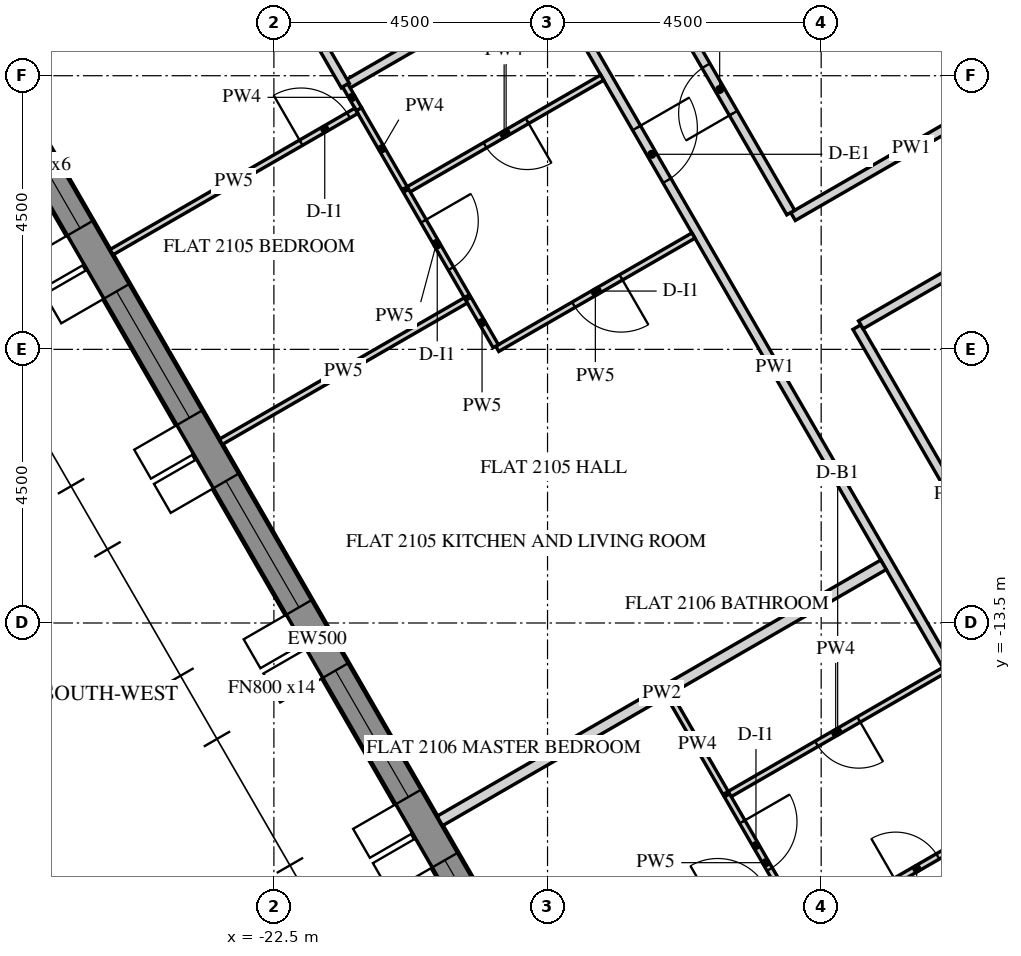
"""IFC4 building model, lengths in metres.
Left out: names, types, materials, properties, quantities, classifications, styles, units other than length and angle.
Written with IfcOpenShell. Run it as: python <this file> out.ifc"""

import sys

from ifc_helpers import new_model, si_unit, direction, frame, frame_2d, origin, place, context, subcontext, project, spatial, polyline, rectangle, outline, extrude, element, fill, save


model = new_model("IFC4")
c1 = context("Model", 3, precision=1e-05, world=origin(), true_north=direction((0.0, 1.0)))
c2 = subcontext(c1, "Body", "Model", "MODEL_VIEW")
j1 = project(units=[si_unit("LENGTHUNIT", "METRE"), si_unit("PLANEANGLEUNIT", "RADIAN")], contexts=[c1])
p1 = place(None, origin())
s1 = spatial("IfcSite", under=j1, at=p1, CompositionType="ELEMENT")
p2 = place(p1, origin())
s2 = spatial("IfcBuilding", under=s1, at=p2, CompositionType="ELEMENT")
p3 = place(p2, frame((0.0, 0.0, 267.9)))
s3 = spatial("IfcBuildingStorey", under=s2, at=p3, CompositionType="ELEMENT", Elevation=267.9)
p4 = place(p3, frame((-28.149, -2.745, -0.15), z_axis=(0.0, 0.0, 1.0), x_axis=(0.500003737743, -0.866023245787, 0.0)))
e1 = element("IfcWall", 1, at=p4, inside=s3, PredefinedType="SOLIDWALL", context=c2, shape_type="SweptSolid", body=[
    extrude(outline(polyline([(-0.021, -0.25), (25.468, -0.25), (25.421, 0.25), (0.021, 0.25), (-0.021, -0.25)])), origin(), (0.0, 0.0, 1.0), 3.9),
])
p5 = place(p4, frame((2.522, 0.0, 0.75)))
e2 = element("IfcOpeningElement", 2, at=p5, cuts=e1, PredefinedType="OPENING", context=c2, shape_type="SweptSolid", body=[
    extrude(rectangle(XDim=2.4, YDim=2.7, at=frame_2d((1.2, 1.35))), frame((0.0, 0.26, 0.0), z_axis=(0.0, -1.0, 0.0), x_axis=(1.0, 0.0, 0.0)), (0.0, 0.0, 1.0), 0.52),
])
p6 = place(p4, frame((6.122, 0.0, 0.75)))
e3 = element("IfcOpeningElement", 3, at=p6, cuts=e1, PredefinedType="OPENING", context=c2, shape_type="SweptSolid", body=[
    extrude(rectangle(XDim=2.4, YDim=2.7, at=frame_2d((1.2, 1.35))), frame((0.0, 0.26, 0.0), z_axis=(0.0, -1.0, 0.0), x_axis=(1.0, 0.0, 0.0)), (0.0, 0.0, 1.0), 0.52),
])
p7 = place(p4, frame((9.722, 0.0, 0.75)))
e4 = element("IfcOpeningElement", 4, at=p7, cuts=e1, PredefinedType="OPENING", context=c2, shape_type="SweptSolid", body=[
    extrude(rectangle(XDim=2.4, YDim=2.7, at=frame_2d((1.2, 1.35))), frame((0.0, 0.26, 0.0), z_axis=(0.0, -1.0, 0.0), x_axis=(1.0, 0.0, 0.0)), (0.0, 0.0, 1.0), 0.52),
])
p8 = place(p4, frame((13.323, 0.0, 0.75)))
e5 = element("IfcOpeningElement", 5, at=p8, cuts=e1, PredefinedType="OPENING", context=c2, shape_type="SweptSolid", body=[
    extrude(rectangle(XDim=2.4, YDim=2.7, at=frame_2d((1.2, 1.35))), frame((0.0, 0.26, 0.0), z_axis=(0.0, -1.0, 0.0), x_axis=(1.0, 0.0, 0.0)), (0.0, 0.0, 1.0), 0.52),
])
p9 = place(p4, frame((16.922, 0.0, 0.75)))
e6 = element("IfcOpeningElement", 6, at=p9, cuts=e1, PredefinedType="OPENING", context=c2, shape_type="SweptSolid", body=[
    extrude(rectangle(XDim=2.4, YDim=2.7, at=frame_2d((1.2, 1.35))), frame((0.0, 0.26, 0.0), z_axis=(0.0, -1.0, 0.0), x_axis=(1.0, 0.0, 0.0)), (0.0, 0.0, 1.0), 0.52),
])
p10 = place(p4, frame((20.522, 0.0, 0.75)))
e7 = element("IfcOpeningElement", 7, at=p10, cuts=e1, PredefinedType="OPENING", context=c2, shape_type="SweptSolid", body=[
    extrude(rectangle(XDim=2.4, YDim=2.7, at=frame_2d((1.2, 1.35))), frame((0.0, 0.26, 0.0), z_axis=(0.0, -1.0, 0.0), x_axis=(1.0, 0.0, 0.0)), (0.0, 0.0, 1.0), 0.52),
])
p11 = place(p3, frame((-12.471, 0.0, -0.15), z_axis=(0.0, 0.0, 1.0), x_axis=(0.499996419489, -0.866027470984, 0.0)))
e8 = element("IfcWall", 8, at=p11, inside=s3, PredefinedType="SHEAR", context=c2, shape_type="SweptSolid", body=[
    extrude(outline(polyline([(-0.115, -0.2), (12.586, -0.2), (12.355, 0.2), (0.115, 0.2), (-0.115, -0.2)])), origin(), (0.0, 0.0, 1.0), 3.9),
])
p12 = place(p11, frame((5.306, 0.0, 0.15)))
e9 = element("IfcOpeningElement", 9, at=p12, cuts=e8, PredefinedType="OPENING", context=c2, shape_type="SweptSolid", body=[
    extrude(rectangle(XDim=1.8, YDim=2.4, at=frame_2d((0.9, 1.2))), frame((0.0, 0.21, 0.0), z_axis=(0.0, -1.0, 0.0), x_axis=(1.0, 0.0, 0.0)), (0.0, 0.0, 1.0), 0.42),
])
p13 = place(p3, frame((-17.998, -2.826, 0.0), z_axis=(0.0, 0.0, 1.0), x_axis=(0.500003306199, -0.866023494941, 0.0)))
e10 = element("IfcWall", 10, at=p13, inside=s3, PredefinedType="PARTITIONING", context=c2, shape_type="SweptSolid", body=[
    extrude(rectangle(XDim=14.949, YDim=0.15, at=frame_2d((7.475, 0.0))), origin(), (0.0, 0.0, 1.0), 2.988),
])
p14 = place(p13, frame((2.925, 0.0, 0.0)))
e11 = element("IfcOpeningElement", 11, at=p14, cuts=e10, PredefinedType="OPENING", context=c2, shape_type="SweptSolid", body=[
    extrude(rectangle(XDim=1.0, YDim=2.1, at=frame_2d((0.5, 1.05))), frame((0.0, 0.085, 0.0), z_axis=(0.0, -1.0, 0.0), x_axis=(1.0, 0.0, 0.0)), (0.0, 0.0, 1.0), 0.17),
])
p15 = place(p13, frame((13.799, 0.0, 0.0)))
e12 = element("IfcOpeningElement", 12, at=p15, cuts=e10, PredefinedType="OPENING", context=c2, shape_type="SweptSolid", body=[
    extrude(rectangle(XDim=1.0, YDim=2.1, at=frame_2d((0.5, 1.05))), frame((0.0, 0.085, 0.0), z_axis=(0.0, -1.0, 0.0), x_axis=(1.0, 0.0, 0.0)), (0.0, 0.0, 1.0), 0.17),
])
p16 = place(p3, frame((-21.327, -4.661, 0.0), z_axis=(0.0, 0.0, 1.0), x_axis=(0.866044365799, 0.499967155389, 0.0)))
e13 = element("IfcWall", 13, at=p16, inside=s3, PredefinedType="PARTITIONING", context=c2, shape_type="SweptSolid", body=[
    extrude(rectangle(XDim=3.8, YDim=0.15, at=frame_2d((1.9, 0.0))), origin(), (0.0, 0.0, 1.0), 2.988),
])
p17 = place(p3, frame((-26.971, -4.284, 0.0), z_axis=(0.0, 0.0, 1.0), x_axis=(0.866018584967, 0.500011810352, 0.0)))
e14 = element("IfcWall", 14, at=p17, inside=s3, PredefinedType="PARTITIONING", context=c2, shape_type="SweptSolid", body=[
    extrude(rectangle(XDim=4.699, YDim=0.15, at=frame_2d((2.349, 0.0))), origin(), (0.0, 0.0, 1.0), 2.988),
])
p18 = place(p3, frame((-22.9, -1.936, 0.0), z_axis=(0.0, 0.0, 1.0), x_axis=(0.50003099832, -0.866007506156, 0.0)))
e15 = element("IfcWall", 15, at=p18, inside=s3, PredefinedType="PARTITIONING", context=c2, shape_type="SweptSolid", body=[
    extrude(rectangle(XDim=3.151, YDim=0.15, at=frame_2d((1.575, 0.0))), origin(), (0.0, 0.0, 1.0), 2.988),
])
p19 = place(p3, frame((-10.066, -4.566, 0.0), z_axis=(0.0, 0.0, 1.0), x_axis=(-0.866031096941, -0.499990139034, 0.0)))
e16 = element("IfcWall", 16, at=p19, inside=s3, PredefinedType="PARTITIONING", context=c2, shape_type="SweptSolid", body=[
    extrude(rectangle(XDim=4.5, YDim=0.15, at=frame_2d((2.25, 0.0))), origin(), (0.0, 0.0, 1.0), 2.988),
])
p20 = place(p3, frame((-14.0, -6.751, 0.0), z_axis=(0.0, 0.0, 1.0), x_axis=(-0.500008739126, 0.866020358189, 0.0)))
e17 = element("IfcWall", 17, at=p20, inside=s3, PredefinedType="PARTITIONING", context=c2, shape_type="SweptSolid", body=[
    extrude(rectangle(XDim=4.675, YDim=0.15, at=frame_2d((2.338, 0.0))), origin(), (0.0, 0.0, 1.0), 2.988),
])
p21 = place(p20, frame((1.888, 0.0, 0.0)))
e18 = element("IfcOpeningElement", 18, at=p21, cuts=e17, PredefinedType="OPENING", context=c2, shape_type="SweptSolid", body=[
    extrude(rectangle(XDim=0.9, YDim=2.1, at=frame_2d((0.45, 1.05))), frame((0.0, 0.085, 0.0), z_axis=(0.0, -1.0, 0.0), x_axis=(1.0, 0.0, 0.0)), (0.0, 0.0, 1.0), 0.17),
])
p22 = place(p3, frame((-9.735, -14.138, 0.0), z_axis=(0.0, 0.0, 1.0), x_axis=(-0.500018385592, 0.866014788598, 0.0)))
e19 = element("IfcWall", 19, at=p22, inside=s3, PredefinedType="PARTITIONING", context=c2, shape_type="SweptSolid", body=[
    extrude(rectangle(XDim=6.356, YDim=0.15, at=frame_2d((3.178, 0.0))), origin(), (0.0, 0.0, 1.0), 2.988),
])
p23 = place(p3, frame((-12.848, -8.597, 0.0), z_axis=(0.0, 0.0, 1.0), x_axis=(0.866017452598, 0.500013771606, 0.0)))
e20 = element("IfcWall", 20, at=p23, inside=s3, PredefinedType="PARTITIONING", context=c2, shape_type="SweptSolid", body=[
    extrude(rectangle(XDim=4.425, YDim=0.15, at=frame_2d((2.213, 0.0))), origin(), (0.0, 0.0, 1.0), 2.988),
])
p24 = place(p3, frame((-15.601, -7.129, 0.0), z_axis=(0.0, 0.0, 1.0), x_axis=(-0.866056803351, -0.499945610411, 0.0)))
e21 = element("IfcWall", 21, at=p24, inside=s3, PredefinedType="PARTITIONING", context=c2, shape_type="SweptSolid", body=[
    extrude(rectangle(XDim=3.725, YDim=0.1, at=frame_2d((1.863, 0.0))), origin(), (0.0, 0.0, 1.0), 2.988),
])
p25 = place(p24, frame((1.375, 0.0, 0.0)))
e22 = element("IfcOpeningElement", 22, at=p25, cuts=e21, PredefinedType="OPENING", context=c2, shape_type="SweptSolid", body=[
    extrude(rectangle(XDim=0.9, YDim=2.1, at=frame_2d((0.45, 1.05))), frame((0.0, 0.06, 0.0), z_axis=(0.0, -1.0, 0.0), x_axis=(1.0, 0.0, 0.0)), (0.0, 0.0, 1.0), 0.12),
])
p26 = place(p3, frame((-18.852, -8.948, 0.0), z_axis=(0.0, 0.0, 1.0), x_axis=(-0.500074377092, 0.865982457891, 0.0)))
e23 = element("IfcWall", 23, at=p26, inside=s3, PredefinedType="PARTITIONING", context=c2, shape_type="SweptSolid", body=[
    extrude(rectangle(XDim=0.901, YDim=0.1, at=frame_2d((0.45, 0.0))), origin(), (0.0, 0.0, 1.0), 2.988),
])
p27 = place(p3, frame((-19.344, -8.195, 0.0), z_axis=(0.0, 0.0, 1.0), x_axis=(-0.866034331223, -0.499984536904, 0.0)))
e24 = element("IfcWall", 24, at=p27, inside=s3, PredefinedType="PARTITIONING", context=c2, shape_type="SweptSolid", body=[
    extrude(rectangle(XDim=4.65, YDim=0.1, at=frame_2d((2.325, 0.0))), origin(), (0.0, 0.0, 1.0), 2.988),
])
p28 = place(p3, frame((-19.771, -16.755, 0.0), z_axis=(0.0, 0.0, 1.0), x_axis=(0.866026819143, 0.499997548519, 0.0)))
e25 = element("IfcWall", 25, at=p28, inside=s3, PredefinedType="PARTITIONING", context=c2, shape_type="SweptSolid", body=[
    extrude(rectangle(XDim=8.425, YDim=0.18, at=frame_2d((4.212, 0.0))), origin(), (0.0, 0.0, 1.0), 2.988),
])
p29 = place(p3, frame((-17.101, -4.531, 0.0), z_axis=(0.0, 0.0, 1.0), x_axis=(-0.866028424924, -0.499994767197, 0.0)))
e26 = element("IfcWall", 26, at=p29, inside=s3, PredefinedType="PARTITIONING", context=c2, shape_type="SweptSolid", body=[
    extrude(rectangle(XDim=3.725, YDim=0.1, at=frame_2d((1.863, 0.0))), origin(), (0.0, 0.0, 1.0), 2.988),
])
p30 = place(p29, frame((1.425, 0.0, 0.0)))
e27 = element("IfcOpeningElement", 27, at=p30, cuts=e26, PredefinedType="OPENING", context=c2, shape_type="SweptSolid", body=[
    extrude(rectangle(XDim=0.8, YDim=2.1, at=frame_2d((0.4, 1.05))), frame((0.0, 0.06, 0.0), z_axis=(0.0, -1.0, 0.0), x_axis=(1.0, 0.0, 0.0)), (0.0, 0.0, 1.0), 0.12),
])
p31 = place(p3, frame((-20.328, -6.392, 0.0), z_axis=(0.0, 0.0, 1.0), x_axis=(0.500031897912, -0.866006986733, 0.0)))
e28 = element("IfcWall", 28, at=p31, inside=s3, PredefinedType="PARTITIONING", context=c2, shape_type="SweptSolid", body=[
    extrude(rectangle(XDim=2.003, YDim=0.1, at=frame_2d((1.001, 0.0))), origin(), (0.0, 0.0, 1.0), 2.988),
])
p32 = place(p31, frame((0.578, 0.0, 0.0)))
e29 = element("IfcOpeningElement", 29, at=p32, cuts=e28, PredefinedType="OPENING", context=c2, shape_type="SweptSolid", body=[
    extrude(rectangle(XDim=0.9, YDim=2.1, at=frame_2d((0.45, 1.05))), frame((0.0, 0.06, 0.0), z_axis=(0.0, -1.0, 0.0), x_axis=(1.0, 0.0, 0.0)), (0.0, 0.0, 1.0), 0.12),
])
p33 = place(p3, frame((-21.328, -4.659, 0.0), z_axis=(0.0, 0.0, 1.0), x_axis=(0.500250683452, -0.865880623242, 0.0)))
e30 = element("IfcWall", 30, at=p33, inside=s3, PredefinedType="PARTITIONING", context=c2, shape_type="SweptSolid", body=[
    extrude(rectangle(XDim=0.453, YDim=0.1, at=frame_2d((0.227, 0.0))), origin(), (0.0, 0.0, 1.0), 2.988),
])
p34 = place(p3, frame((-21.101, -5.052, 0.0), z_axis=(0.0, 0.0, 1.0), x_axis=(0.49997126526, -0.866041993159, 0.0)))
e31 = element("IfcWall", 31, at=p34, inside=s3, PredefinedType="PARTITIONING", context=c2, shape_type="SweptSolid", body=[
    extrude(rectangle(XDim=1.5, YDim=0.1, at=frame_2d((0.75, 0.0))), origin(), (0.0, 0.0, 1.0), 2.988),
])
p35 = place(p3, frame((-25.171, -7.402, 0.0), z_axis=(0.0, 0.0, 1.0), x_axis=(0.86602120543, 0.500007271693, 0.0)))
e32 = element("IfcWall", 32, at=p35, inside=s3, PredefinedType="PARTITIONING", context=c2, shape_type="SweptSolid", body=[
    extrude(rectangle(XDim=4.65, YDim=0.1, at=frame_2d((2.325, 0.0))), origin(), (0.0, 0.0, 1.0), 2.988),
])
p36 = place(p35, frame((3.6, 0.0, 0.0)))
e33 = element("IfcOpeningElement", 33, at=p36, cuts=e32, PredefinedType="OPENING", context=c2, shape_type="SweptSolid", body=[
    extrude(rectangle(XDim=0.9, YDim=2.1, at=frame_2d((0.45, 1.05))), frame((0.0, 0.06, 0.0), z_axis=(0.0, -1.0, 0.0), x_axis=(1.0, 0.0, 0.0)), (0.0, 0.0, 1.0), 0.12),
])
p37 = place(p3, frame((-4.238, -15.408, 0.0), z_axis=(0.0, 0.0, 1.0), x_axis=(-0.86602504101, -0.500000628343, 0.0)))
e34 = element("IfcWall", 34, at=p37, inside=s3, PredefinedType="PARTITIONING", context=c2, shape_type="SweptSolid", body=[
    extrude(rectangle(XDim=9.826, YDim=0.1, at=frame_2d((4.913, 0.0))), origin(), (0.0, 0.0, 1.0), 2.988),
])
p38 = place(p3, frame((-11.475, -14.275, 0.0), z_axis=(0.0, 0.0, 1.0), x_axis=(-0.866019999656, -0.500009360108, 0.0)))
e35 = element("IfcWall", 35, at=p38, inside=s3, PredefinedType="PARTITIONING", context=c2, shape_type="SweptSolid", body=[
    extrude(rectangle(XDim=4.125, YDim=0.1, at=frame_2d((2.062, 0.0))), origin(), (0.0, 0.0, 1.0), 2.988),
])
p39 = place(p38, frame((1.625, 0.0, 0.0)))
e36 = element("IfcOpeningElement", 36, at=p39, cuts=e35, PredefinedType="OPENING", context=c2, shape_type="SweptSolid", body=[
    extrude(rectangle(XDim=0.8, YDim=2.1, at=frame_2d((0.4, 1.05))), frame((0.0, 0.06, 0.0), z_axis=(0.0, -1.0, 0.0), x_axis=(1.0, 0.0, 0.0)), (0.0, 0.0, 1.0), 0.12),
])
p40 = place(p3, frame((-15.048, -16.335, 0.0), z_axis=(0.0, 0.0, 1.0), x_axis=(0.500014808323, -0.866016854026, 0.0)))
e37 = element("IfcWall", 37, at=p40, inside=s3, PredefinedType="PARTITIONING", context=c2, shape_type="SweptSolid", body=[
    extrude(rectangle(XDim=2.554, YDim=0.1, at=frame_2d((1.277, 0.0))), origin(), (0.0, 0.0, 1.0), 2.988),
])
p41 = place(p40, frame((0.502, 0.0, 0.0)))
e38 = element("IfcOpeningElement", 38, at=p41, cuts=e37, PredefinedType="OPENING", context=c2, shape_type="SweptSolid", body=[
    extrude(rectangle(XDim=0.9, YDim=2.1, at=frame_2d((0.45, 1.05))), frame((0.0, 0.06, 0.0), z_axis=(0.0, -1.0, 0.0), x_axis=(1.0, 0.0, 0.0)), (0.0, 0.0, 1.0), 0.12),
])
p42 = place(p3, frame((-13.747, -18.589, 0.0), z_axis=(0.0, 0.0, 1.0), x_axis=(0.866022251081, 0.500005460603, 0.0)))
e39 = element("IfcWall", 39, at=p42, inside=s3, PredefinedType="PARTITIONING", context=c2, shape_type="SweptSolid", body=[
    extrude(rectangle(XDim=5.725, YDim=0.1, at=frame_2d((2.863, 0.0))), origin(), (0.0, 0.0, 1.0), 2.988),
])
p43 = place(p42, frame((1.7, 0.0, 0.0)))
e40 = element("IfcOpeningElement", 40, at=p43, cuts=e39, PredefinedType="OPENING", context=c2, shape_type="SweptSolid", body=[
    extrude(rectangle(XDim=0.8, YDim=2.1, at=frame_2d((0.4, 1.05))), frame((0.0, 0.06, 0.0), z_axis=(0.0, -1.0, 0.0), x_axis=(1.0, 0.0, 0.0)), (0.0, 0.0, 1.0), 0.12),
])
p44 = place(p3, frame((-16.002, -14.683, 0.0), z_axis=(0.0, 0.0, 1.0), x_axis=(0.500059143742, -0.865991254436, 0.0)))
e41 = element("IfcWall", 41, at=p44, inside=s3, PredefinedType="PARTITIONING", context=c2, shape_type="SweptSolid", body=[
    extrude(rectangle(XDim=1.862, YDim=0.1, at=frame_2d((0.931, 0.0))), origin(), (0.0, 0.0, 1.0), 2.988),
])
p45 = place(p5, frame((0.0, 0.18, 0.0)))
e42 = element("IfcWindow", 42, at=p45, inside=s3, PartitioningType="DOUBLE_PANEL_VERTICAL", PredefinedType="WINDOW", context=c2, shape_type="SweptSolid", body=[
    extrude(rectangle(XDim=2.4, YDim=2.7, at=frame_2d((1.2, 1.35))), frame((0.0, 0.03, 0.0), z_axis=(0.0, -1.0, 0.0), x_axis=(1.0, 0.0, 0.0)), (0.0, 0.0, 1.0), 0.06),
])
fill(e2, e42)
p46 = place(p6, frame((0.0, 0.18, 0.0)))
e43 = element("IfcWindow", 43, at=p46, inside=s3, PartitioningType="DOUBLE_PANEL_VERTICAL", PredefinedType="WINDOW", context=c2, shape_type="SweptSolid", body=[
    extrude(rectangle(XDim=2.4, YDim=2.7, at=frame_2d((1.2, 1.35))), frame((0.0, 0.03, 0.0), z_axis=(0.0, -1.0, 0.0), x_axis=(1.0, 0.0, 0.0)), (0.0, 0.0, 1.0), 0.06),
])
fill(e3, e43)
p47 = place(p7, frame((0.0, 0.18, 0.0)))
e44 = element("IfcWindow", 44, at=p47, inside=s3, PartitioningType="DOUBLE_PANEL_VERTICAL", PredefinedType="WINDOW", context=c2, shape_type="SweptSolid", body=[
    extrude(rectangle(XDim=2.4, YDim=2.7, at=frame_2d((1.2, 1.35))), frame((0.0, 0.03, 0.0), z_axis=(0.0, -1.0, 0.0), x_axis=(1.0, 0.0, 0.0)), (0.0, 0.0, 1.0), 0.06),
])
fill(e4, e44)
p48 = place(p8, frame((0.0, 0.18, 0.0)))
e45 = element("IfcWindow", 45, at=p48, inside=s3, PartitioningType="DOUBLE_PANEL_VERTICAL", PredefinedType="WINDOW", context=c2, shape_type="SweptSolid", body=[
    extrude(rectangle(XDim=2.4, YDim=2.7, at=frame_2d((1.2, 1.35))), frame((0.0, 0.03, 0.0), z_axis=(0.0, -1.0, 0.0), x_axis=(1.0, 0.0, 0.0)), (0.0, 0.0, 1.0), 0.06),
])
fill(e5, e45)
p49 = place(p9, frame((0.0, 0.18, 0.0)))
e46 = element("IfcWindow", 46, at=p49, inside=s3, PartitioningType="DOUBLE_PANEL_VERTICAL", PredefinedType="WINDOW", context=c2, shape_type="SweptSolid", body=[
    extrude(rectangle(XDim=2.4, YDim=2.7, at=frame_2d((1.2, 1.35))), frame((0.0, 0.03, 0.0), z_axis=(0.0, -1.0, 0.0), x_axis=(1.0, 0.0, 0.0)), (0.0, 0.0, 1.0), 0.06),
])
fill(e6, e46)
p50 = place(p14, origin())
e47 = element("IfcDoor", 47, at=p50, inside=s3, OperationType="SINGLE_SWING_RIGHT", PredefinedType="DOOR", context=c2, shape_type="SweptSolid", body=[
    extrude(rectangle(XDim=1.0, YDim=2.1, at=frame_2d((0.5, 1.05))), frame((0.0, 0.025, 0.0), z_axis=(0.0, -1.0, 0.0), x_axis=(1.0, 0.0, 0.0)), (0.0, 0.0, 1.0), 0.05),
])
fill(e11, e47)
p51 = place(p30, origin())
e48 = element("IfcDoor", 48, at=p51, inside=s3, OperationType="SINGLE_SWING_RIGHT", PredefinedType="DOOR", context=c2, shape_type="SweptSolid", body=[
    extrude(rectangle(XDim=0.8, YDim=2.1, at=frame_2d((0.4, 1.05))), frame((0.0, 0.025, 0.0), z_axis=(0.0, -1.0, 0.0), x_axis=(1.0, 0.0, 0.0)), (0.0, 0.0, 1.0), 0.05),
])
fill(e27, e48)
p52 = place(p25, origin())
e49 = element("IfcDoor", 49, at=p52, inside=s3, OperationType="SINGLE_SWING_RIGHT", PredefinedType="DOOR", context=c2, shape_type="SweptSolid", body=[
    extrude(rectangle(XDim=0.9, YDim=2.1, at=frame_2d((0.45, 1.05))), frame((0.0, 0.025, 0.0), z_axis=(0.0, -1.0, 0.0), x_axis=(1.0, 0.0, 0.0)), (0.0, 0.0, 1.0), 0.05),
])
fill(e22, e49)
p53 = place(p36, origin())
e50 = element("IfcDoor", 50, at=p53, inside=s3, OperationType="SINGLE_SWING_RIGHT", PredefinedType="DOOR", context=c2, shape_type="SweptSolid", body=[
    extrude(rectangle(XDim=0.9, YDim=2.1, at=frame_2d((0.45, 1.05))), frame((0.0, 0.025, 0.0), z_axis=(0.0, -1.0, 0.0), x_axis=(1.0, 0.0, 0.0)), (0.0, 0.0, 1.0), 0.05),
])
fill(e33, e50)
p54 = place(p32, origin())
e51 = element("IfcDoor", 51, at=p54, inside=s3, OperationType="SINGLE_SWING_LEFT", PredefinedType="DOOR", context=c2, shape_type="SweptSolid", body=[
    extrude(rectangle(XDim=0.9, YDim=2.1, at=frame_2d((0.45, 1.05))), frame((0.0, 0.025, 0.0), z_axis=(0.0, -1.0, 0.0), x_axis=(1.0, 0.0, 0.0)), (0.0, 0.0, 1.0), 0.05),
])
fill(e29, e51)
p55 = place(p39, origin())
e52 = element("IfcDoor", 52, at=p55, inside=s3, OperationType="SINGLE_SWING_RIGHT", PredefinedType="DOOR", context=c2, shape_type="SweptSolid", body=[
    extrude(rectangle(XDim=0.8, YDim=2.1, at=frame_2d((0.4, 1.05))), frame((0.0, 0.025, 0.0), z_axis=(0.0, -1.0, 0.0), x_axis=(1.0, 0.0, 0.0)), (0.0, 0.0, 1.0), 0.05),
])
fill(e36, e52)
p56 = place(p41, origin())
e53 = element("IfcDoor", 53, at=p56, inside=s3, OperationType="SINGLE_SWING_LEFT", PredefinedType="DOOR", context=c2, shape_type="SweptSolid", body=[
    extrude(rectangle(XDim=0.9, YDim=2.1, at=frame_2d((0.45, 1.05))), frame((0.0, 0.025, 0.0), z_axis=(0.0, -1.0, 0.0), x_axis=(1.0, 0.0, 0.0)), (0.0, 0.0, 1.0), 0.05),
])
fill(e38, e53)
p57 = place(p43, origin())
e54 = element("IfcDoor", 54, at=p57, inside=s3, OperationType="SINGLE_SWING_RIGHT", PredefinedType="DOOR", context=c2, shape_type="SweptSolid", body=[
    extrude(rectangle(XDim=0.8, YDim=2.1, at=frame_2d((0.4, 1.05))), frame((0.0, 0.025, 0.0), z_axis=(0.0, -1.0, 0.0), x_axis=(1.0, 0.0, 0.0)), (0.0, 0.0, 1.0), 0.05),
])
fill(e40, e54)
p58 = place(p21, origin())
e55 = element("IfcDoor", 55, at=p58, inside=s3, OperationType="SINGLE_SWING_RIGHT", PredefinedType="DOOR", context=c2, shape_type="SweptSolid", body=[
    extrude(rectangle(XDim=0.9, YDim=2.1, at=frame_2d((0.45, 1.05))), frame((0.0, 0.025, 0.0), z_axis=(0.0, -1.0, 0.0), x_axis=(1.0, 0.0, 0.0)), (0.0, 0.0, 1.0), 0.05),
])
fill(e18, e55)
save(model, sys.argv[1])
